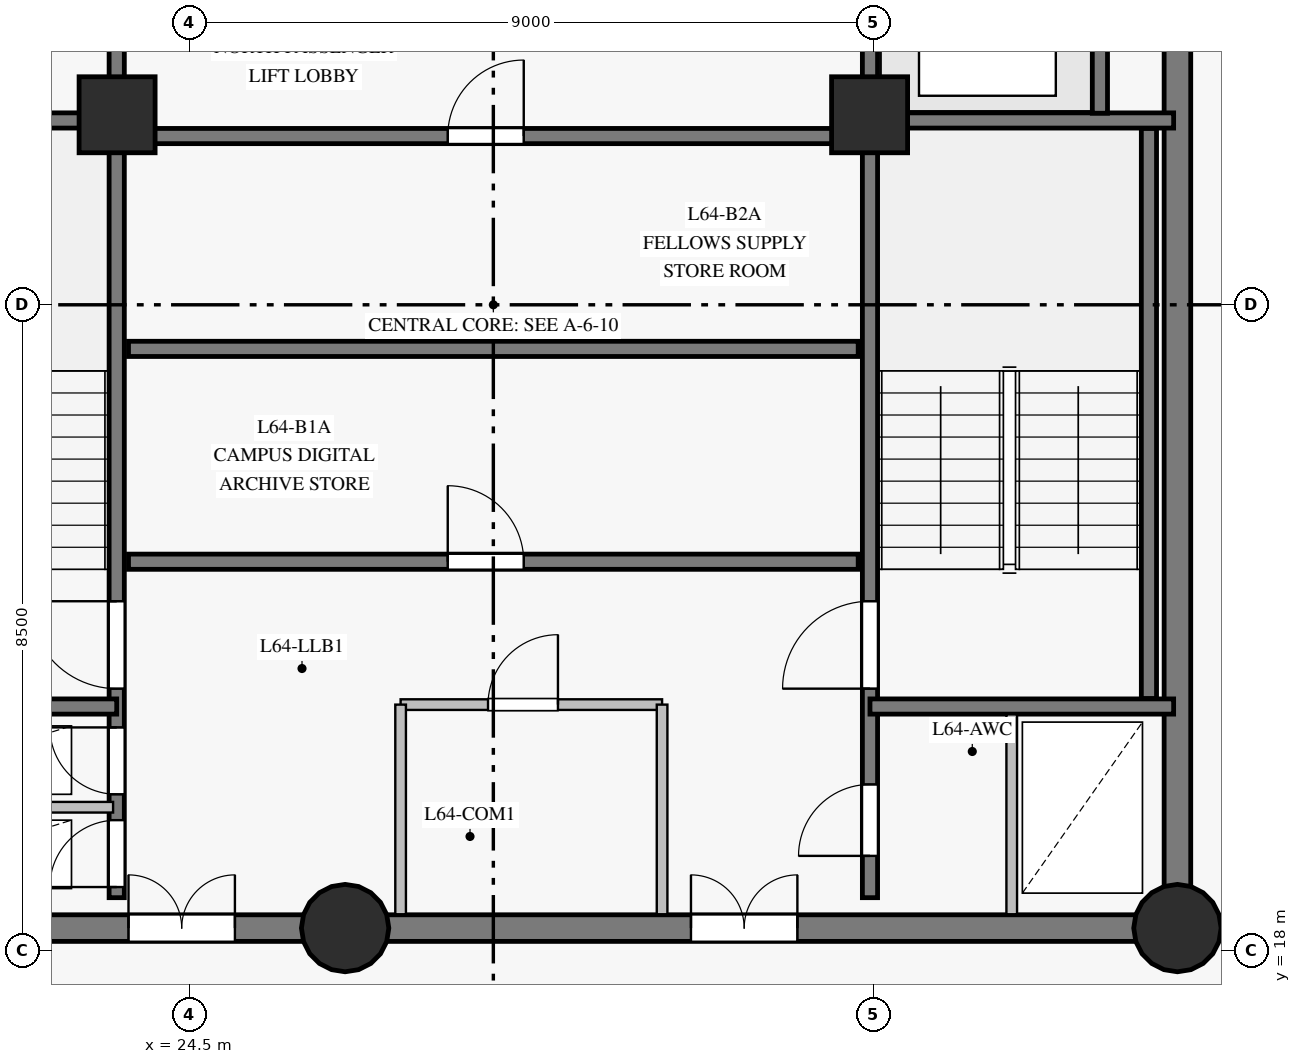
"""IFC4 building model, lengths in metres.
Left out: names, types, materials, properties, quantities, classifications, styles, units other than length and angle.
Written with IfcOpenShell. Run it as: python <this file> out.ifc"""

import sys

from ifc_helpers import new_model, si_unit, direction, frame, frame_2d, origin, origin_with_axes, origin_2d, place, context, subcontext, project, spatial, rectangle, circle, extrude, source, transform, mapped, element, fill, save


model = new_model("IFC4")
c1 = context("Model", 3, precision=1e-05, world=origin(), true_north=direction((0.0, 1.0)))
c2 = subcontext(c1, "Body", "Model", "MODEL_VIEW")
j1 = project(units=[si_unit("LENGTHUNIT", "METRE"), si_unit("PLANEANGLEUNIT", "RADIAN")], contexts=[c1])
p1 = place(None, origin())
s1 = spatial("IfcSite", under=j1, at=p1, CompositionType="ELEMENT")
p2 = place(p1, origin())
s2 = spatial("IfcBuilding", under=s1, at=p2, CompositionType="ELEMENT")
p3 = place(p2, frame((0.0, 0.0, 219.95)))
s3 = spatial("IfcBuildingStorey", under=s2, at=p3, CompositionType="ELEMENT", Elevation=219.95)
p4 = place(p3, frame((19.5, 18.3, 0.0), z_axis=(0.0, 0.0, 1.0), x_axis=(1.0, 0.0, 0.0)))
e1 = element("IfcWall", 1, at=p4, inside=s3, PredefinedType="SHEAR", context=c2, shape_type="SweptSolid", body=[
    extrude(rectangle(XDim=7.05, YDim=0.35, at=frame_2d((3.525, 0.0))), origin(), (0.0, 0.0, 1.0), 2.85),
])
p5 = place(p4, frame((4.2, 0.0, 0.0)))
e2 = element("IfcOpeningElement", 2, at=p5, cuts=e1, PredefinedType="OPENING", context=c2, shape_type="SweptSolid", body=[
    extrude(rectangle(XDim=1.4, YDim=2.2, at=frame_2d((0.7, 1.1))), frame((0.0, 0.185, 0.0), z_axis=(0.0, -1.0, 0.0), x_axis=(1.0, 0.0, 0.0)), (0.0, 0.0, 1.0), 0.37),
])
p6 = place(p3, frame((26.55, 18.3, 0.0), z_axis=(0.0, 0.0, 1.0), x_axis=(1.0, 0.0, 0.0)))
e3 = element("IfcWall", 3, at=p6, inside=s3, PredefinedType="SHEAR", context=c2, shape_type="SweptSolid", body=[
    extrude(rectangle(XDim=10.95, YDim=0.35, at=frame_2d((5.475, 0.0))), origin(), (0.0, 0.0, 1.0), 2.85),
])
p7 = place(p6, frame((4.55, 0.0, 0.0)))
e4 = element("IfcOpeningElement", 4, at=p7, cuts=e3, PredefinedType="OPENING", context=c2, shape_type="SweptSolid", body=[
    extrude(rectangle(XDim=1.4, YDim=2.2, at=frame_2d((0.7, 1.1))), frame((0.0, 0.185, 0.0), z_axis=(0.0, -1.0, 0.0), x_axis=(1.0, 0.0, 0.0)), (0.0, 0.0, 1.0), 0.37),
])
p8 = place(p3, frame((37.5, 18.3, 0.0), z_axis=(0.0, 0.0, 1.0), x_axis=(0.0, 1.0, 0.0)))
e5 = element("IfcWall", 5, at=p8, inside=s3, PredefinedType="SHEAR", context=c2, shape_type="SweptSolid", body=[
    extrude(rectangle(XDim=16.4, YDim=0.35, at=frame_2d((8.2, 0.0))), origin(), (0.0, 0.0, 1.0), 2.85),
])
p9 = place(p8, frame((13.85, 0.0, 0.0)))
e6 = element("IfcOpeningElement", 6, at=p9, cuts=e5, PredefinedType="OPENING", context=c2, shape_type="SweptSolid", body=[
    extrude(rectangle(XDim=1.2, YDim=2.15, at=frame_2d((0.6, 1.075))), frame((0.0, 0.185, 0.0), z_axis=(0.0, -1.0, 0.0), x_axis=(1.0, 0.0, 0.0)), (0.0, 0.0, 1.0), 0.37),
])
m1 = source(origin_with_axes(), c2, "Body", "SweptSolid", [
    extrude(circle(Radius=0.575, at=origin_2d()), origin(), (0.0, 0.0, 1.0), 3.05),
])
for number, where, z_axis, x_axis in (
    (7, (26.55, 18.3, 0.0), (0.0, 0.0, 1.0), (1.0, 0.0, 0.0)),
    (8, (37.5, 18.3, 0.0), (0.0, 0.0, 1.0), (1.0, 0.0, 0.0)),
):
    element("IfcColumn", number, at=place(p3, frame(where, z_axis=z_axis, x_axis=x_axis)), inside=s3, PredefinedType="COLUMN", context=c2, shape_type="MappedRepresentation", body=[
        mapped(m1, transform((0.0, 0.0, 0.0), scale=1.0)),
    ])
m2 = source(origin_with_axes(), c2, "Body", "SweptSolid", [
    extrude(rectangle(XDim=1.0, YDim=1.0, at=origin_2d()), origin(), (0.0, 0.0, 1.0), 3.05),
])
for number, where, z_axis, x_axis in (
    (9, (23.55, 29.0, 0.0), (0.0, 0.0, 1.0), (1.0, 0.0, 0.0)),
    (10, (33.45, 29.0, 0.0), (0.0, 0.0, 1.0), (1.0, 0.0, 0.0)),
):
    element("IfcColumn", number, at=place(p3, frame(where, z_axis=z_axis, x_axis=x_axis)), inside=s3, PredefinedType="COLUMN", context=c2, shape_type="MappedRepresentation", body=[
        mapped(m2, transform((0.0, 0.0, 0.0), scale=1.0)),
    ])
p10 = place(p3, frame((23.545, 18.7, 0.0), z_axis=(0.0, 0.0, 1.0), x_axis=(0.0, 1.0, 0.0)))
e11 = element("IfcWall", 11, at=p10, inside=s3, PredefinedType="SHEAR", context=c2, shape_type="SweptSolid", body=[
    extrude(rectangle(XDim=15.6, YDim=0.2, at=frame_2d((7.8, 0.0))), origin(), (0.0, 0.0, 1.0), 2.85),
])
p11 = place(p10, frame((2.75, 0.0, 0.0)))
e12 = element("IfcOpeningElement", 12, at=p11, cuts=e11, PredefinedType="OPENING", context=c2, shape_type="SweptSolid", body=[
    extrude(rectangle(XDim=1.15, YDim=2.15, at=frame_2d((0.575, 1.075))), frame((0.0, 0.11, 0.0), z_axis=(0.0, -1.0, 0.0), x_axis=(1.0, 0.0, 0.0)), (0.0, 0.0, 1.0), 0.22),
])
p12 = place(p10, frame((0.14, 0.0, 0.0)))
e13 = element("IfcOpeningElement", 13, at=p12, cuts=e11, PredefinedType="OPENING", context=c2, shape_type="SweptSolid", body=[
    extrude(rectangle(XDim=0.88, YDim=2.1, at=frame_2d((0.44, 1.05))), frame((0.0, 0.11, 0.0), z_axis=(0.0, -1.0, 0.0), x_axis=(1.0, 0.0, 0.0)), (0.0, 0.0, 1.0), 0.22),
])
p13 = place(p10, frame((1.36, 0.0, 0.0)))
e14 = element("IfcOpeningElement", 14, at=p13, cuts=e11, PredefinedType="OPENING", context=c2, shape_type="SweptSolid", body=[
    extrude(rectangle(XDim=0.88, YDim=2.1, at=frame_2d((0.44, 1.05))), frame((0.0, 0.11, 0.0), z_axis=(0.0, -1.0, 0.0), x_axis=(1.0, 0.0, 0.0)), (0.0, 0.0, 1.0), 0.22),
])
p14 = place(p10, frame((12.1, 0.0, 0.0)))
e15 = element("IfcOpeningElement", 15, at=p14, cuts=e11, PredefinedType="OPENING", context=c2, shape_type="SweptSolid", body=[
    extrude(rectangle(XDim=1.12, YDim=2.15, at=frame_2d((0.56, 1.075))), frame((0.0, 0.11, 0.0), z_axis=(0.0, -1.0, 0.0), x_axis=(1.0, 0.0, 0.0)), (0.0, 0.0, 1.0), 0.22),
])
p15 = place(p10, frame((14.05, 0.0, 0.0)))
e16 = element("IfcOpeningElement", 16, at=p15, cuts=e11, PredefinedType="OPENING", context=c2, shape_type="SweptSolid", body=[
    extrude(rectangle(XDim=1.12, YDim=2.15, at=frame_2d((0.56, 1.075))), frame((0.0, 0.11, 0.0), z_axis=(0.0, -1.0, 0.0), x_axis=(1.0, 0.0, 0.0)), (0.0, 0.0, 1.0), 0.22),
])
p16 = place(p3, frame((33.455, 18.7, 0.0), z_axis=(0.0, 0.0, 1.0), x_axis=(0.0, 1.0, 0.0)))
e17 = element("IfcWall", 17, at=p16, inside=s3, PredefinedType="SHEAR", context=c2, shape_type="SweptSolid", body=[
    extrude(rectangle(XDim=15.6, YDim=0.2, at=frame_2d((7.8, 0.0))), origin(), (0.0, 0.0, 1.0), 2.85),
])
p17 = place(p16, frame((2.75, 0.0, 0.0)))
e18 = element("IfcOpeningElement", 18, at=p17, cuts=e17, PredefinedType="OPENING", context=c2, shape_type="SweptSolid", body=[
    extrude(rectangle(XDim=1.15, YDim=2.15, at=frame_2d((0.575, 1.075))), frame((0.0, 0.11, 0.0), z_axis=(0.0, -1.0, 0.0), x_axis=(1.0, 0.0, 0.0)), (0.0, 0.0, 1.0), 0.22),
])
p18 = place(p16, frame((0.55, 0.0, 0.0)))
e19 = element("IfcOpeningElement", 19, at=p18, cuts=e17, PredefinedType="OPENING", context=c2, shape_type="SweptSolid", body=[
    extrude(rectangle(XDim=0.94, YDim=2.1, at=frame_2d((0.47, 1.05))), frame((0.0, 0.11, 0.0), z_axis=(0.0, -1.0, 0.0), x_axis=(1.0, 0.0, 0.0)), (0.0, 0.0, 1.0), 0.22),
])
p19 = place(p3, frame((23.7, 23.12, 0.0), z_axis=(0.0, 0.0, 1.0), x_axis=(1.0, 0.0, 0.0)))
e20 = element("IfcWall", 20, at=p19, inside=s3, PredefinedType="SHEAR", context=c2, shape_type="SweptSolid", body=[
    extrude(rectangle(XDim=9.6, YDim=0.2, at=frame_2d((4.8, 0.0))), origin(), (0.0, 0.0, 1.0), 2.85),
])
p20 = place(p19, frame((4.2, 0.0, 0.0)))
e21 = element("IfcOpeningElement", 21, at=p20, cuts=e20, PredefinedType="OPENING", context=c2, shape_type="SweptSolid", body=[
    extrude(rectangle(XDim=1.0, YDim=2.15, at=frame_2d((0.5, 1.075))), frame((0.0, 0.11, 0.0), z_axis=(0.0, -1.0, 0.0), x_axis=(1.0, 0.0, 0.0)), (0.0, 0.0, 1.0), 0.22),
])
p21 = place(p3, frame((23.7, 25.92, 0.0), z_axis=(0.0, 0.0, 1.0), x_axis=(1.0, 0.0, 0.0)))
e22 = element("IfcWall", 22, at=p21, inside=s3, PredefinedType="SHEAR", context=c2, shape_type="SweptSolid", body=[
    extrude(rectangle(XDim=9.6, YDim=0.2, at=frame_2d((4.8, 0.0))), origin(), (0.0, 0.0, 1.0), 2.85),
])
p22 = place(p3, frame((23.7, 28.72, 0.0), z_axis=(0.0, 0.0, 1.0), x_axis=(1.0, 0.0, 0.0)))
e23 = element("IfcWall", 23, at=p22, inside=s3, PredefinedType="SHEAR", context=c2, shape_type="SweptSolid", body=[
    extrude(rectangle(XDim=9.6, YDim=0.2, at=frame_2d((4.8, 0.0))), origin(), (0.0, 0.0, 1.0), 2.85),
])
p23 = place(p22, frame((4.2, 0.0, 0.0)))
e24 = element("IfcOpeningElement", 24, at=p23, cuts=e23, PredefinedType="OPENING", context=c2, shape_type="SweptSolid", body=[
    extrude(rectangle(XDim=1.0, YDim=2.15, at=frame_2d((0.5, 1.075))), frame((0.0, 0.11, 0.0), z_axis=(0.0, -1.0, 0.0), x_axis=(1.0, 0.0, 0.0)), (0.0, 0.0, 1.0), 0.22),
])
p24 = place(p3, frame((37.125, 21.32, 0.0), z_axis=(0.0, 0.0, 1.0), x_axis=(0.0, 1.0, 0.0)))
e25 = element("IfcWall", 25, at=p24, inside=s3, PredefinedType="SHEAR", context=c2, shape_type="SweptSolid", body=[
    extrude(rectangle(XDim=7.5, YDim=0.2, at=frame_2d((3.75, 0.0))), origin(), (0.0, 0.0, 1.0), 2.85),
])
for number, where, z_axis, x_axis in (
    (26, (33.455, 21.215, 0.0), (0.0, 0.0, 1.0), (1.0, 0.0, 0.0)),
    (27, (33.455, 28.925, 0.0), (0.0, 0.0, 1.0), (1.0, 0.0, 0.0)),
    (28, (19.55, 21.215, 0.0), (0.0, 0.0, 1.0), (1.0, 0.0, 0.0)),
    (29, (19.55, 28.925, 0.0), (0.0, 0.0, 1.0), (1.0, 0.0, 0.0)),
):
    element("IfcWall", number, at=place(p3, frame(where, z_axis=z_axis, x_axis=x_axis)), inside=s3, PredefinedType="SHEAR", context=c2, shape_type="SweptSolid", body=[
        extrude(rectangle(XDim=3.995, YDim=0.2, at=frame_2d((1.998, 0.0))), origin(), (0.0, 0.0, 1.0), 2.85),
    ])
p25 = place(p3, frame((36.48, 29.02, 0.0), z_axis=(0.0, 0.0, 1.0), x_axis=(0.0, 1.0, 0.0)))
e30 = element("IfcWall", 30, at=p25, inside=s3, PredefinedType="SHEAR", context=c2, shape_type="SweptSolid", body=[
    extrude(rectangle(XDim=2.86, YDim=0.2, at=frame_2d((1.43, 0.0))), origin(), (0.0, 0.0, 1.0), 2.85),
])
p26 = place(p3, frame((19.682, 19.89, 0.0), z_axis=(0.0, 0.0, 1.0), x_axis=(1.0, 0.0, 0.0)))
e31 = element("IfcWall", 31, at=p26, inside=s3, PredefinedType="PARTITIONING", context=c2, shape_type="SweptSolid", body=[
    extrude(rectangle(XDim=3.815, YDim=0.14, at=frame_2d((1.908, 0.0))), origin(), (0.0, 0.0, 1.0), 2.85),
])
p27 = place(p3, frame((27.28, 21.24, 0.0), z_axis=(0.0, 0.0, 1.0), x_axis=(1.0, 0.0, 0.0)))
e32 = element("IfcWall", 32, at=p27, inside=s3, PredefinedType="PARTITIONING", context=c2, shape_type="SweptSolid", body=[
    extrude(rectangle(XDim=3.44, YDim=0.14, at=frame_2d((1.72, 0.0))), origin(), (0.0, 0.0, 1.0), 2.85),
])
p28 = place(p27, frame((1.15, 0.0, 0.0)))
e33 = element("IfcOpeningElement", 33, at=p28, cuts=e32, PredefinedType="OPENING", context=c2, shape_type="SweptSolid", body=[
    extrude(rectangle(XDim=0.92, YDim=2.1, at=frame_2d((0.46, 1.05))), frame((0.0, 0.08, 0.0), z_axis=(0.0, -1.0, 0.0), x_axis=(1.0, 0.0, 0.0)), (0.0, 0.0, 1.0), 0.16),
])
for number, where, z_axis, x_axis in (
    (34, (27.28, 18.482, 0.0), (0.0, 0.0, 1.0), (0.0, 1.0, 0.0)),
    (35, (30.72, 18.482, 0.0), (0.0, 0.0, 1.0), (0.0, 1.0, 0.0)),
):
    element("IfcWall", number, at=place(p3, frame(where, z_axis=z_axis, x_axis=x_axis)), inside=s3, PredefinedType="PARTITIONING", context=c2, shape_type="SweptSolid", body=[
        extrude(rectangle(XDim=2.758, YDim=0.14, at=frame_2d((1.379, 0.0))), origin(), (0.0, 0.0, 1.0), 2.85),
    ])
p29 = place(p3, frame((35.32, 18.482, 0.0), z_axis=(0.0, 0.0, 1.0), x_axis=(0.0, 1.0, 0.0)))
e36 = element("IfcWall", 36, at=p29, inside=s3, PredefinedType="PARTITIONING", context=c2, shape_type="SweptSolid", body=[
    extrude(rectangle(XDim=2.629, YDim=0.14, at=frame_2d((1.314, 0.0))), origin(), (0.0, 0.0, 1.0), 2.85),
])
m3 = source(origin_with_axes(), c2, "Body", "SweptSolid", [
    extrude(rectangle(XDim=1.15, YDim=2.15, at=frame_2d((0.575, 1.075))), frame((0.0, 0.025, 0.0), z_axis=(0.0, -1.0, 0.0), x_axis=(1.0, 0.0, 0.0)), (0.0, 0.0, 1.0), 0.05),
])
p30 = place(p11, origin())
e37 = element("IfcDoor", 37, at=p30, inside=s3, OperationType="SINGLE_SWING_RIGHT", PredefinedType="DOOR", context=c2, shape_type="MappedRepresentation", body=[
    mapped(m3, transform((0.0, 0.0, 0.0), scale=1.0)),
])
fill(e12, e37)
p31 = place(p17, origin())
e38 = element("IfcDoor", 38, at=p31, inside=s3, OperationType="SINGLE_SWING_LEFT", PredefinedType="DOOR", context=c2, shape_type="MappedRepresentation", body=[
    mapped(m3, transform((0.0, 0.0, 0.0), scale=1.0)),
])
fill(e18, e38)
m4 = source(origin_with_axes(), c2, "Body", "SweptSolid", [
    extrude(rectangle(XDim=0.88, YDim=2.1, at=frame_2d((0.44, 1.05))), frame((0.0, 0.025, 0.0), z_axis=(0.0, -1.0, 0.0), x_axis=(1.0, 0.0, 0.0)), (0.0, 0.0, 1.0), 0.05),
])
p32 = place(p12, origin())
e39 = element("IfcDoor", 39, at=p32, inside=s3, OperationType="SINGLE_SWING_LEFT", PredefinedType="DOOR", context=c2, shape_type="MappedRepresentation", body=[
    mapped(m4, transform((0.0, 0.0, 0.0), scale=1.0)),
])
fill(e13, e39)
p33 = place(p13, origin())
e40 = element("IfcDoor", 40, at=p33, inside=s3, OperationType="SINGLE_SWING_RIGHT", PredefinedType="DOOR", context=c2, shape_type="MappedRepresentation", body=[
    mapped(m4, transform((0.0, 0.0, 0.0), scale=1.0)),
])
fill(e14, e40)
m5 = source(origin_with_axes(), c2, "Body", "SweptSolid", [
    extrude(rectangle(XDim=1.4, YDim=2.2, at=frame_2d((0.7, 1.1))), frame((0.0, 0.025, 0.0), z_axis=(0.0, -1.0, 0.0), x_axis=(1.0, 0.0, 0.0)), (0.0, 0.0, 1.0), 0.05),
])
p34 = place(p5, origin())
e41 = element("IfcDoor", 41, at=p34, inside=s3, OperationType="DOUBLE_DOOR_SINGLE_SWING", PredefinedType="DOOR", context=c2, shape_type="MappedRepresentation", body=[
    mapped(m5, transform((0.0, 0.0, 0.0), scale=1.0)),
])
fill(e2, e41)
p35 = place(p7, origin())
e42 = element("IfcDoor", 42, at=p35, inside=s3, OperationType="DOUBLE_DOOR_SINGLE_SWING", PredefinedType="DOOR", context=c2, shape_type="MappedRepresentation", body=[
    mapped(m5, transform((0.0, 0.0, 0.0), scale=1.0)),
])
fill(e4, e42)
m6 = source(origin_with_axes(), c2, "Body", "SweptSolid", [
    extrude(rectangle(XDim=0.94, YDim=2.1, at=frame_2d((0.47, 1.05))), frame((0.0, 0.025, 0.0), z_axis=(0.0, -1.0, 0.0), x_axis=(1.0, 0.0, 0.0)), (0.0, 0.0, 1.0), 0.05),
])
p36 = place(p18, origin())
e43 = element("IfcDoor", 43, at=p36, inside=s3, OperationType="SINGLE_SWING_LEFT", PredefinedType="DOOR", context=c2, shape_type="MappedRepresentation", body=[
    mapped(m6, transform((0.0, 0.0, 0.0), scale=1.0)),
])
fill(e19, e43)
m7 = source(origin_with_axes(), c2, "Body", "SweptSolid", [
    extrude(rectangle(XDim=0.92, YDim=2.1, at=frame_2d((0.46, 1.05))), frame((0.0, 0.025, 0.0), z_axis=(0.0, -1.0, 0.0), x_axis=(1.0, 0.0, 0.0)), (0.0, 0.0, 1.0), 0.05),
])
p37 = place(p28, origin())
e44 = element("IfcDoor", 44, at=p37, inside=s3, OperationType="SINGLE_SWING_RIGHT", PredefinedType="DOOR", context=c2, shape_type="MappedRepresentation", body=[
    mapped(m7, transform((0.0, 0.0, 0.0), scale=1.0)),
])
fill(e33, e44)
m8 = source(origin_with_axes(), c2, "Body", "SweptSolid", [
    extrude(rectangle(XDim=1.0, YDim=2.15, at=frame_2d((0.5, 1.075))), frame((0.0, 0.025, 0.0), z_axis=(0.0, -1.0, 0.0), x_axis=(1.0, 0.0, 0.0)), (0.0, 0.0, 1.0), 0.05),
])
p38 = place(p20, origin())
e45 = element("IfcDoor", 45, at=p38, inside=s3, OperationType="SINGLE_SWING_LEFT", PredefinedType="DOOR", context=c2, shape_type="MappedRepresentation", body=[
    mapped(m8, transform((0.0, 0.0, 0.0), scale=1.0)),
])
fill(e21, e45)
p39 = place(p23, origin())
e46 = element("IfcDoor", 46, at=p39, inside=s3, OperationType="SINGLE_SWING_RIGHT", PredefinedType="DOOR", context=c2, shape_type="MappedRepresentation", body=[
    mapped(m8, transform((0.0, 0.0, 0.0), scale=1.0)),
])
fill(e24, e46)
save(model, sys.argv[1])
